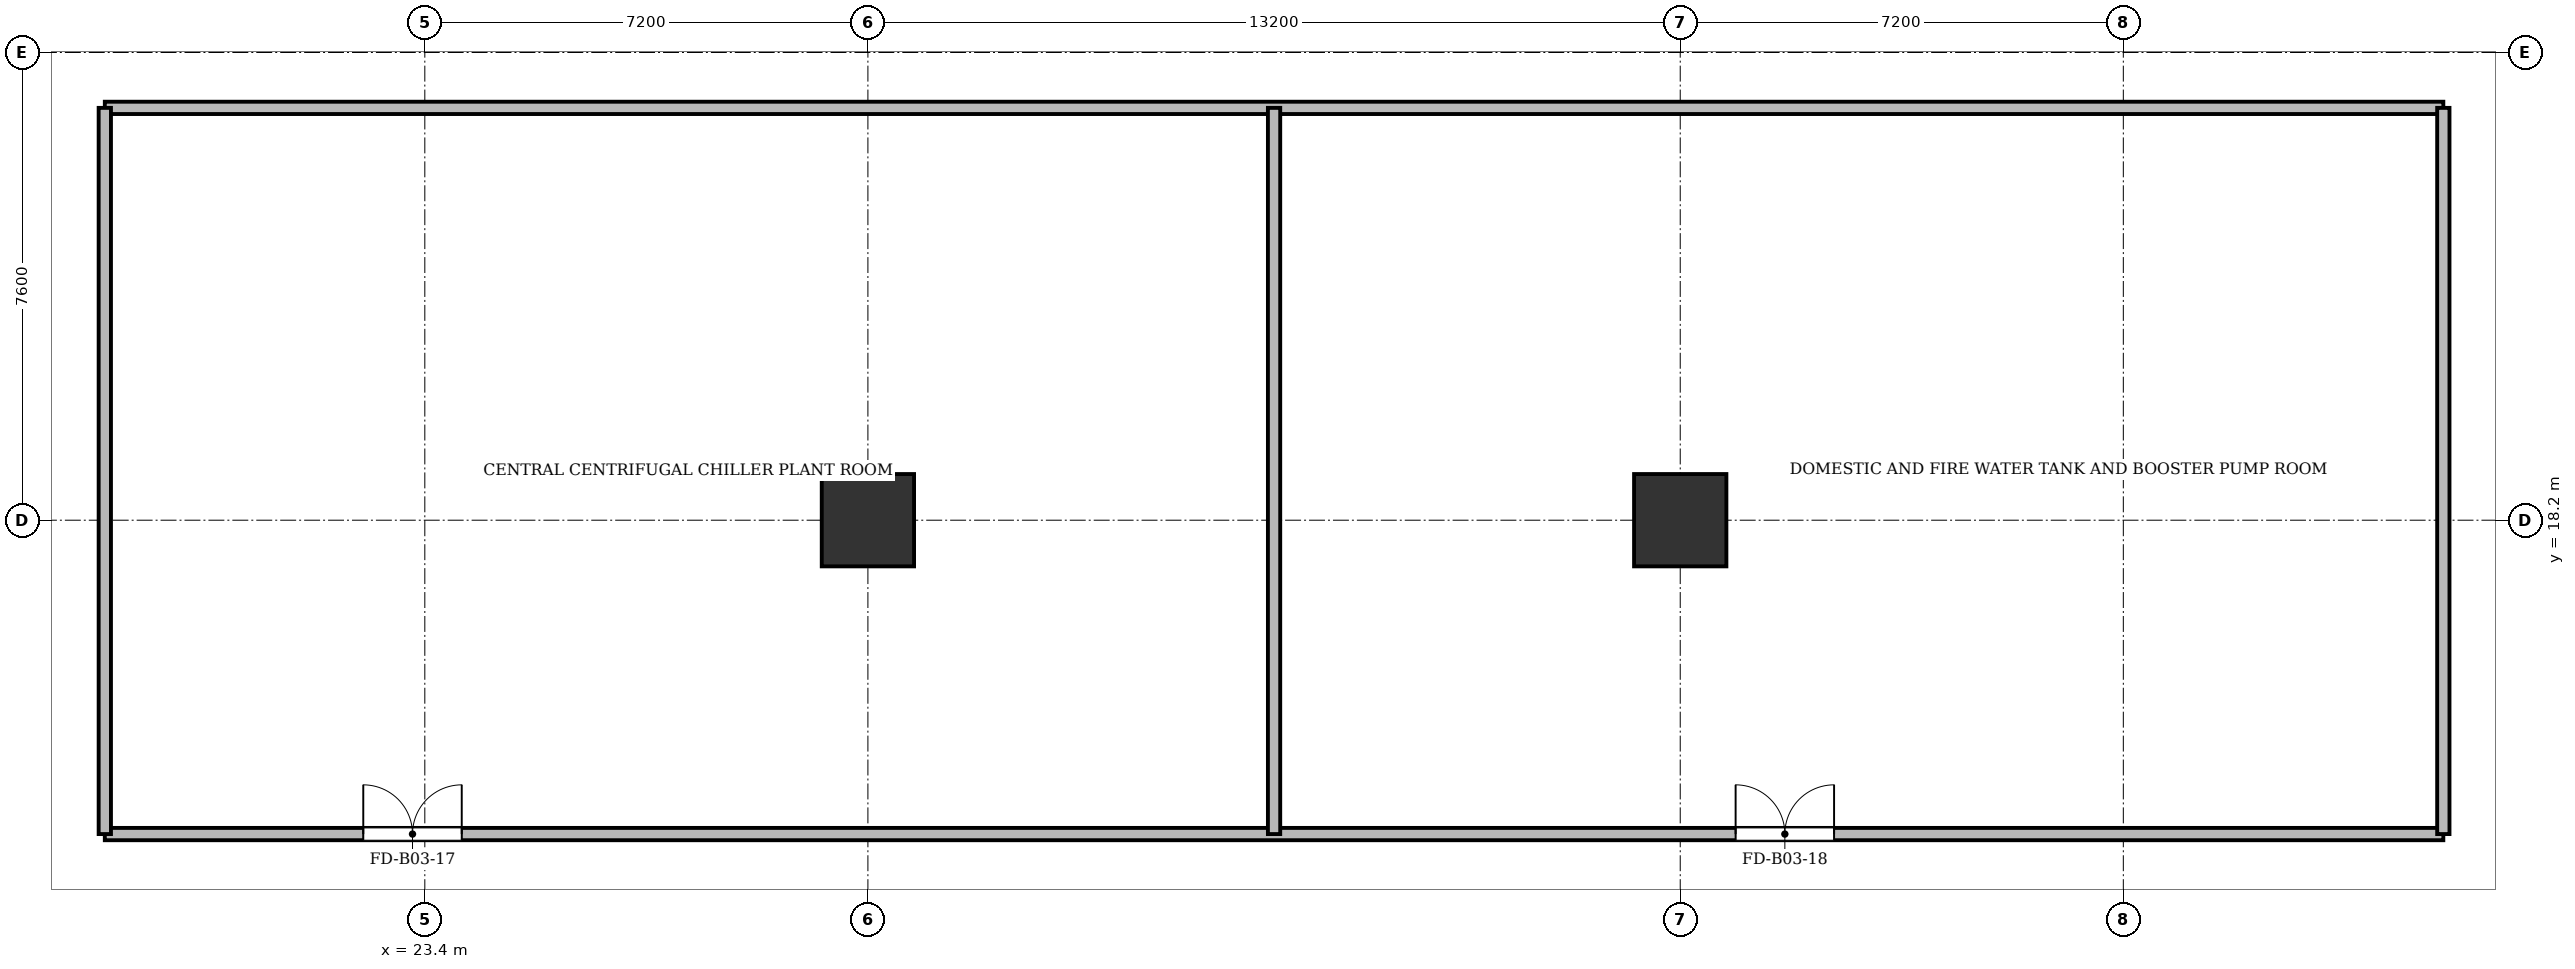
"""IFC4 building model, lengths in metres.
Left out: names, types, materials, properties, quantities, classifications, styles, units other than length and angle.
Written with IfcOpenShell. Run it as: python <this file> out.ifc"""

import sys

from ifc_helpers import new_model, si_unit, direction, frame, frame_2d, origin, origin_2d, place, context, subcontext, project, spatial, rectangle, extrude, source, transform, mapped, element, fill, save


model = new_model("IFC4")
c1 = context("Model", 3, precision=1e-05, world=origin(), true_north=direction((0.0, 1.0)))
c2 = subcontext(c1, "Body", "Model", "MODEL_VIEW")
j1 = project(units=[si_unit("LENGTHUNIT", "METRE"), si_unit("PLANEANGLEUNIT", "RADIAN")], contexts=[c1])
p1 = place(None, origin())
s1 = spatial("IfcSite", under=j1, at=p1, CompositionType="ELEMENT")
p2 = place(p1, origin())
s2 = spatial("IfcBuilding", under=s1, at=p2, CompositionType="ELEMENT")
p3 = place(p2, frame((0.0, 0.0, -13.2)))
s3 = spatial("IfcBuildingStorey", under=s2, at=p3, CompositionType="ELEMENT", Elevation=-13.2)
m1 = source(origin(), c2, "Body", "SweptSolid", [
    extrude(rectangle(XDim=1.5, YDim=1.5, at=origin_2d()), origin(), (0.0, 0.0, 1.0), 4.6),
])
for number, where, z_axis, x_axis in (
    (1, (30.6, 18.2, 0.0), (0.0, 0.0, 1.0), (1.0, 0.0, 0.0)),
    (2, (43.8, 18.2, 0.0), (0.0, 0.0, 1.0), (1.0, 0.0, 0.0)),
):
    element("IfcColumn", number, at=place(p3, frame(where, z_axis=z_axis, x_axis=x_axis)), inside=s3, PredefinedType="COLUMN", context=c2, shape_type="MappedRepresentation", body=[
        mapped(m1, transform((0.0, 0.0, 0.0), x_axis=(1.0, 0.0, 0.0), y_axis=(0.0, 1.0, 0.0), z_axis=(0.0, 0.0, 1.0), scale=1.0)),
    ])
p4 = place(p3, frame((18.2, 13.1, 0.0), z_axis=(0.0, 0.0, 1.0), x_axis=(1.0, 0.0, 0.0)))
e3 = element("IfcWall", 3, at=p4, inside=s3, PredefinedType="PARTITIONING", context=c2, shape_type="SweptSolid", body=[
    extrude(rectangle(XDim=38.0, YDim=0.2, at=frame_2d((19.0, 0.0))), origin(), (0.0, 0.0, 1.0), 3.63),
])
p5 = place(p4, frame((4.2, 0.0, 0.0)))
e4 = element("IfcOpeningElement", 4, at=p5, cuts=e3, PredefinedType="OPENING", context=c2, shape_type="SweptSolid", body=[
    extrude(rectangle(XDim=1.6, YDim=2.2, at=frame_2d((0.8, 1.1))), frame((0.0, 0.11, 0.0), z_axis=(0.0, -1.0, 0.0), x_axis=(1.0, 0.0, 0.0)), (0.0, 0.0, 1.0), 0.22),
])
p6 = place(p4, frame((26.5, 0.0, 0.0)))
e5 = element("IfcOpeningElement", 5, at=p6, cuts=e3, PredefinedType="OPENING", context=c2, shape_type="SweptSolid", body=[
    extrude(rectangle(XDim=1.6, YDim=2.2, at=frame_2d((0.8, 1.1))), frame((0.0, 0.11, 0.0), z_axis=(0.0, -1.0, 0.0), x_axis=(1.0, 0.0, 0.0)), (0.0, 0.0, 1.0), 0.22),
])
p7 = place(p3, frame((18.2, 24.9, 0.0), z_axis=(0.0, 0.0, 1.0), x_axis=(1.0, 0.0, 0.0)))
e6 = element("IfcWall", 6, at=p7, inside=s3, PredefinedType="PARTITIONING", context=c2, shape_type="SweptSolid", body=[
    extrude(rectangle(XDim=38.0, YDim=0.2, at=frame_2d((19.0, 0.0))), origin(), (0.0, 0.0, 1.0), 3.63),
])
for number, where, z_axis, x_axis in (
    (7, (18.2, 13.1, 0.0), (0.0, 0.0, 1.0), (0.0, 1.0, 0.0)),
    (8, (56.2, 13.1, 0.0), (0.0, 0.0, 1.0), (0.0, 1.0, 0.0)),
    (9, (37.2, 13.1, 0.0), (0.0, 0.0, 1.0), (0.0, 1.0, 0.0)),
):
    element("IfcWall", number, at=place(p3, frame(where, z_axis=z_axis, x_axis=x_axis)), inside=s3, PredefinedType="PARTITIONING", context=c2, shape_type="SweptSolid", body=[
        extrude(rectangle(XDim=11.8, YDim=0.2, at=frame_2d((5.9, 0.0))), origin(), (0.0, 0.0, 1.0), 3.38),
    ])
m2 = source(origin(), c2, "Body", "SweptSolid", [
    extrude(rectangle(XDim=1.6, YDim=2.2, at=frame_2d((0.8, 1.1))), frame((0.0, 0.025, 0.0), z_axis=(0.0, -1.0, 0.0), x_axis=(1.0, 0.0, 0.0)), (0.0, 0.0, 1.0), 0.05),
])
p8 = place(p5, origin())
e10 = element("IfcDoor", 10, at=p8, inside=s3, OperationType="DOUBLE_DOOR_SINGLE_SWING", PredefinedType="DOOR", context=c2, shape_type="MappedRepresentation", body=[
    mapped(m2, transform((0.0, 0.0, 0.0), x_axis=(1.0, 0.0, 0.0), y_axis=(0.0, 1.0, 0.0), z_axis=(0.0, 0.0, 1.0), scale=1.0)),
])
fill(e4, e10)
p9 = place(p6, origin())
e11 = element("IfcDoor", 11, at=p9, inside=s3, OperationType="DOUBLE_DOOR_SINGLE_SWING", PredefinedType="DOOR", context=c2, shape_type="MappedRepresentation", body=[
    mapped(m2, transform((0.0, 0.0, 0.0), x_axis=(1.0, 0.0, 0.0), y_axis=(0.0, 1.0, 0.0), z_axis=(0.0, 0.0, 1.0), scale=1.0)),
])
fill(e5, e11)
save(model, sys.argv[1])
